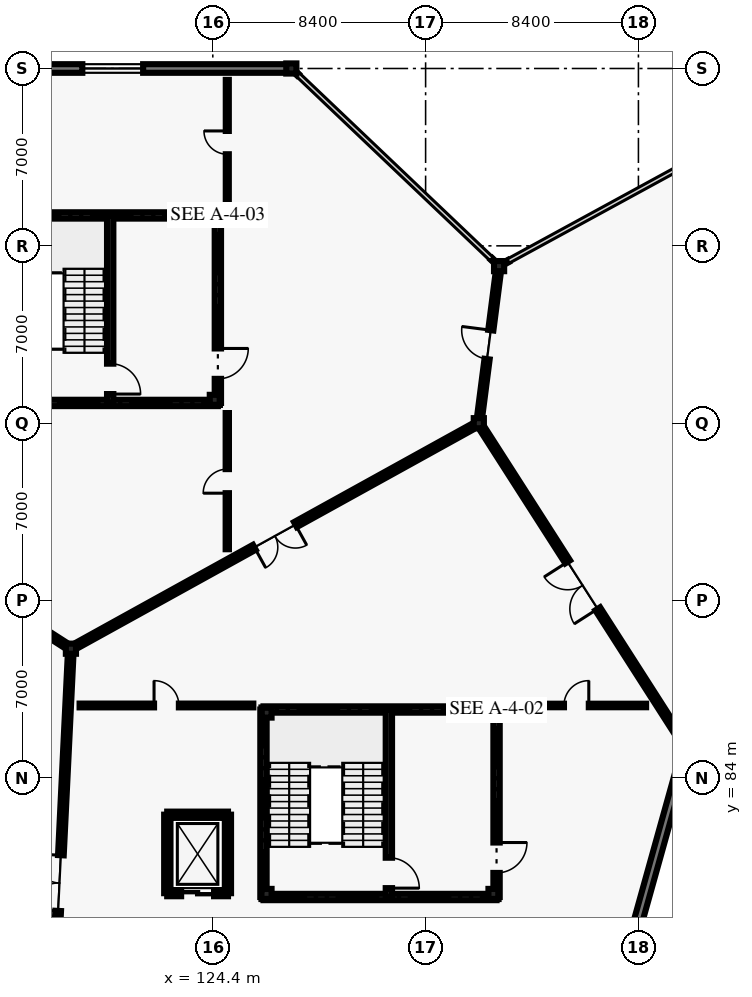
"""IFC4 building model, lengths in metres.
Left out: names, types, materials, properties, quantities, classifications, styles, units other than length and angle.
Written with IfcOpenShell. Run it as: python <this file> out.ifc"""

import sys

from ifc_helpers import new_model, si_unit, direction, frame, frame_2d, origin, origin_2d, place, context, subcontext, project, spatial, rectangle, i_section, extrude, element, fill, save


model = new_model("IFC4")
c1 = context("Model", 3, precision=1e-05, world=origin(), true_north=direction((0.0, 1.0)))
c2 = subcontext(c1, "Body", "Model", "MODEL_VIEW")
j1 = project(units=[si_unit("LENGTHUNIT", "METRE"), si_unit("PLANEANGLEUNIT", "RADIAN")], contexts=[c1])
p1 = place(None, origin())
s1 = spatial("IfcSite", under=j1, at=p1, CompositionType="ELEMENT")
p2 = place(p1, origin())
s2 = spatial("IfcBuilding", under=s1, at=p2, CompositionType="ELEMENT")
p3 = place(p2, frame((0.0, 0.0, 5.4)))
s3 = spatial("IfcBuildingStorey", under=s2, at=p3, CompositionType="ELEMENT", Elevation=5.4)
for number, where, z_axis, x_axis in (
    (1, (118.8, 89.1, 0.0), (0.0, 0.0, 1.0), (1.0, 0.0, 0.0)),
    (2, (127.5, 112.0, 0.0), (0.0, 0.0, 1.0), (1.0, 0.0, 0.0)),
    (3, (134.9, 98.0, 0.0), (0.0, 0.0, 1.0), (1.0, 0.0, 0.0)),
    (4, (135.7, 104.2, 0.0), (0.0, 0.0, 1.0), (1.0, 0.0, 0.0)),
    (5, (126.52, 79.42, 0.0), (0.0, 0.0, 1.0), (1.0, 0.0, 0.0)),
    (6, (135.48, 79.42, 0.0), (0.0, 0.0, 1.0), (1.0, 0.0, 0.0)),
    (7, (135.48, 86.58, 0.0), (0.0, 0.0, 1.0), (1.0, 0.0, 0.0)),
    (8, (126.52, 86.58, 0.0), (0.0, 0.0, 1.0), (1.0, 0.0, 0.0)),
    (9, (124.48, 98.92, 0.0), (0.0, 0.0, 1.0), (1.0, 0.0, 0.0)),
    (10, (124.48, 106.08, 0.0), (0.0, 0.0, 1.0), (1.0, 0.0, 0.0)),
):
    element("IfcColumn", number, at=place(p3, frame(where, z_axis=z_axis, x_axis=x_axis)), inside=s3, PredefinedType="COLUMN", context=c2, shape_type="SweptSolid", body=[
        extrude(i_section(OverallWidth=0.4, OverallDepth=0.4, WebThickness=0.022, FlangeThickness=0.036, at=origin_2d()), origin(), (0.0, 0.0, 1.0), 4.8),
    ])
p4 = place(p3, frame((143.084, 85.142, 0.0), z_axis=(0.0, 0.0, 1.0), x_axis=(-0.268810029922, -0.963193214165, 0.0)))
e11 = element("IfcWall", 11, at=p4, inside=s3, PredefinedType="SOLIDWALL", context=c2, shape_type="SweptSolid", body=[
    extrude(rectangle(XDim=13.333, YDim=0.34, at=frame_2d((6.667, 0.0))), origin(), (0.0, 0.0, 1.0), 3.62),
])
for number, where, z_axis, x_axis in (
    (12, (127.53, 111.971, 0.0), (0.0, 0.0, 1.0), (0.726, -0.687, 0.0)),
    (13, (135.403, 104.482, 0.0), (0.0, 0.0, 1.0), (0.726, -0.687, 0.0)),
):
    element("IfcWall", number, at=place(p3, frame(where, z_axis=z_axis, x_axis=x_axis)), inside=s3, PredefinedType="SOLIDWALL", context=c2, shape_type="SweptSolid", body=[
        extrude(rectangle(XDim=0.308, YDim=0.095, at=frame_2d((0.154, 0.0))), origin(), (0.0, 0.0, 1.0), 3.62),
    ])
p5 = place(p3, frame((113.4, 112.0, 0.0), z_axis=(0.0, 0.0, 1.0), x_axis=(1.0, 0.0, 0.0)))
e14 = element("IfcWall", 14, at=p5, inside=s3, PredefinedType="SOLIDWALL", context=c2, shape_type="SweptSolid", body=[
    extrude(rectangle(XDim=14.1, YDim=0.34, at=frame_2d((7.05, 0.0))), origin(), (0.0, 0.0, 1.0), 3.62),
])
p6 = place(p5, frame((5.85, 0.0, 0.95)))
e15 = element("IfcOpeningElement", 15, at=p6, cuts=e14, PredefinedType="OPENING", context=c2, shape_type="SweptSolid", body=[
    extrude(rectangle(XDim=2.4, YDim=1.8, at=frame_2d((1.2, 0.9))), frame((0.0, 0.18, 0.0), z_axis=(0.0, -1.0, 0.0), x_axis=(1.0, 0.0, 0.0)), (0.0, 0.0, 1.0), 0.36),
])
p7 = place(p3, frame((135.79, 104.249, 0.0), z_axis=(0.0, 0.0, 1.0), x_axis=(0.876984894636, 0.480517944077, 0.0)))
e16 = element("IfcWall", 16, at=p7, inside=s3, PredefinedType="SOLIDWALL", context=c2, shape_type="SweptSolid", body=[
    extrude(rectangle(XDim=0.308, YDim=0.095, at=frame_2d((0.154, 0.0))), origin(), (0.0, 0.0, 1.0), 3.62),
])
p8 = place(p3, frame((117.9, 70.6, 0.0), z_axis=(0.0, 0.0, 1.0), x_axis=(0.048599072515, 0.998818366947, 0.0)))
e17 = element("IfcWall", 17, at=p8, inside=s3, PredefinedType="SOLIDWALL", context=c2, shape_type="SweptSolid", body=[
    extrude(rectangle(XDim=18.522, YDim=0.225, at=frame_2d((9.261, 0.0))), origin(), (0.0, 0.0, 1.0), 4.02),
])
p9 = place(p8, frame((8.161, 0.0, 0.0)))
e18 = element("IfcOpeningElement", 18, at=p9, cuts=e17, PredefinedType="OPENING", context=c2, shape_type="SweptSolid", body=[
    extrude(rectangle(XDim=2.2, YDim=2.6, at=frame_2d((1.1, 1.3))), frame((0.0, 0.123, 0.0), z_axis=(0.0, -1.0, 0.0), x_axis=(1.0, 0.0, 0.0)), (0.0, 0.0, 1.0), 0.245),
])
p10 = place(p3, frame((118.8, 89.1, 0.0), z_axis=(0.0, 0.0, 1.0), x_axis=(-0.841183241423, 0.540750177392, 0.0)))
e19 = element("IfcWall", 19, at=p10, inside=s3, PredefinedType="SOLIDWALL", context=c2, shape_type="SweptSolid", body=[
    extrude(rectangle(XDim=18.308, YDim=0.225, at=frame_2d((9.154, 0.0))), origin(), (0.0, 0.0, 1.0), 4.02),
])
p11 = place(p10, frame((8.154, 0.0, 0.0)))
e20 = element("IfcOpeningElement", 20, at=p11, cuts=e19, PredefinedType="OPENING", context=c2, shape_type="SweptSolid", body=[
    extrude(rectangle(XDim=2.0, YDim=2.5, at=frame_2d((1.0, 1.25))), frame((0.0, 0.123, 0.0), z_axis=(0.0, -1.0, 0.0), x_axis=(1.0, 0.0, 0.0)), (0.0, 0.0, 1.0), 0.245),
])
p12 = place(p3, frame((134.9, 98.0, 0.0), z_axis=(0.0, 0.0, 1.0), x_axis=(-0.875181353329, -0.483794996652, 0.0)))
e21 = element("IfcWall", 21, at=p12, inside=s3, PredefinedType="SOLIDWALL", context=c2, shape_type="SweptSolid", body=[
    extrude(rectangle(XDim=18.396, YDim=0.225, at=frame_2d((9.198, 0.0))), origin(), (0.0, 0.0, 1.0), 4.02),
])
p13 = place(p12, frame((8.273, 0.0, 0.0)))
e22 = element("IfcOpeningElement", 22, at=p13, cuts=e21, PredefinedType="OPENING", context=c2, shape_type="SweptSolid", body=[
    extrude(rectangle(XDim=1.85, YDim=2.4, at=frame_2d((0.925, 1.2))), frame((0.0, 0.123, 0.0), z_axis=(0.0, -1.0, 0.0), x_axis=(1.0, 0.0, 0.0)), (0.0, 0.0, 1.0), 0.245),
])
p14 = place(p3, frame((143.1, 85.2, 0.0), z_axis=(0.0, 0.0, 1.0), x_axis=(-0.539434641352, 0.842027474439, 0.0)))
e23 = element("IfcWall", 23, at=p14, inside=s3, PredefinedType="SOLIDWALL", context=c2, shape_type="SweptSolid", body=[
    extrude(rectangle(XDim=15.201, YDim=0.225, at=frame_2d((7.601, 0.0))), origin(), (0.0, 0.0, 1.0), 4.02),
])
p15 = place(p14, frame((6.501, 0.0, 0.0)))
e24 = element("IfcOpeningElement", 24, at=p15, cuts=e23, PredefinedType="OPENING", context=c2, shape_type="SweptSolid", body=[
    extrude(rectangle(XDim=2.2, YDim=2.6, at=frame_2d((1.1, 1.3))), frame((0.0, 0.123, 0.0), z_axis=(0.0, -1.0, 0.0), x_axis=(1.0, 0.0, 0.0)), (0.0, 0.0, 1.0), 0.245),
])
p16 = place(p3, frame((134.9, 98.0, 0.0), z_axis=(0.0, 0.0, 1.0), x_axis=(0.127980011854, 0.991776747341, 0.0)))
e25 = element("IfcWall", 25, at=p16, inside=s3, PredefinedType="SOLIDWALL", context=c2, shape_type="SweptSolid", body=[
    extrude(rectangle(XDim=6.251, YDim=0.205, at=frame_2d((3.126, 0.0))), origin(), (0.0, 0.0, 1.0), 3.32),
])
p17 = place(p16, frame((2.551, 0.0, 0.0)))
e26 = element("IfcOpeningElement", 26, at=p17, cuts=e25, PredefinedType="OPENING", context=c2, shape_type="SweptSolid", body=[
    extrude(rectangle(XDim=1.15, YDim=2.2, at=frame_2d((0.575, 1.1))), frame((0.0, 0.113, 0.0), z_axis=(0.0, -1.0, 0.0), x_axis=(1.0, 0.0, 0.0)), (0.0, 0.0, 1.0), 0.225),
])
p18 = place(p3, frame((119.142, 86.859, 0.0), z_axis=(0.0, 0.0, 1.0), x_axis=(1.0, 0.0, 0.0)))
e27 = element("IfcWall", 27, at=p18, inside=s3, PredefinedType="PARTITIONING", context=c2, shape_type="SweptSolid", body=[
    extrude(rectangle(XDim=6.858, YDim=0.15, at=frame_2d((3.429, 0.0))), origin(), (0.0, 0.0, 1.0), 3.32),
])
p19 = place(p18, frame((2.939, 0.0, 0.0)))
e28 = element("IfcOpeningElement", 28, at=p19, cuts=e27, PredefinedType="OPENING", context=c2, shape_type="SweptSolid", body=[
    extrude(rectangle(XDim=0.98, YDim=2.15, at=frame_2d((0.49, 1.075))), frame((0.0, 0.085, 0.0), z_axis=(0.0, -1.0, 0.0), x_axis=(1.0, 0.0, 0.0)), (0.0, 0.0, 1.0), 0.17),
])
p20 = place(p3, frame((136.0, 86.859, 0.0), z_axis=(0.0, 0.0, 1.0), x_axis=(1.0, 0.0, 0.0)))
e29 = element("IfcWall", 29, at=p20, inside=s3, PredefinedType="PARTITIONING", context=c2, shape_type="SweptSolid", body=[
    extrude(rectangle(XDim=5.503, YDim=0.14, at=frame_2d((2.751, 0.0))), origin(), (0.0, 0.0, 1.0), 3.32),
])
p21 = place(p20, frame((2.261, 0.0, 0.0)))
e30 = element("IfcOpeningElement", 30, at=p21, cuts=e29, PredefinedType="OPENING", context=c2, shape_type="SweptSolid", body=[
    extrude(rectangle(XDim=0.98, YDim=2.15, at=frame_2d((0.49, 1.075))), frame((0.0, 0.08, 0.0), z_axis=(0.0, -1.0, 0.0), x_axis=(1.0, 0.0, 0.0)), (0.0, 0.0, 1.0), 0.16),
])
p22 = place(p3, frame((124.972, 93.026, 0.0), z_axis=(0.0, 0.0, 1.0), x_axis=(0.0, 1.0, 0.0)))
e31 = element("IfcWall", 31, at=p22, inside=s3, PredefinedType="PARTITIONING", context=c2, shape_type="SweptSolid", body=[
    extrude(rectangle(XDim=5.374, YDim=0.13, at=frame_2d((2.687, 0.0))), origin(), (0.0, 0.0, 1.0), 3.32),
])
p23 = place(p22, frame((2.212, 0.0, 0.0)))
e32 = element("IfcOpeningElement", 32, at=p23, cuts=e31, PredefinedType="OPENING", context=c2, shape_type="SweptSolid", body=[
    extrude(rectangle(XDim=0.95, YDim=2.15, at=frame_2d((0.475, 1.075))), frame((0.0, 0.075, 0.0), z_axis=(0.0, -1.0, 0.0), x_axis=(1.0, 0.0, 0.0)), (0.0, 0.0, 1.0), 0.15),
])
p24 = place(p3, frame((124.972, 106.6, 0.0), z_axis=(0.0, 0.0, 1.0), x_axis=(0.0, 1.0, 0.0)))
e33 = element("IfcWall", 33, at=p24, inside=s3, PredefinedType="PARTITIONING", context=c2, shape_type="SweptSolid", body=[
    extrude(rectangle(XDim=4.95, YDim=0.12, at=frame_2d((2.475, 0.0))), origin(), (0.0, 0.0, 1.0), 3.32),
])
p25 = place(p24, frame((2.015, 0.0, 0.0)))
e34 = element("IfcOpeningElement", 34, at=p25, cuts=e33, PredefinedType="OPENING", context=c2, shape_type="SweptSolid", body=[
    extrude(rectangle(XDim=0.92, YDim=2.1, at=frame_2d((0.46, 1.05))), frame((0.0, 0.07, 0.0), z_axis=(0.0, -1.0, 0.0), x_axis=(1.0, 0.0, 0.0)), (0.0, 0.0, 1.0), 0.14),
])
p26 = place(p3, frame((126.4, 79.3, 0.0), z_axis=(0.0, 0.0, 1.0), x_axis=(0.0, 1.0, 0.0)))
e35 = element("IfcWall", 35, at=p26, inside=s3, PredefinedType="SHEAR", context=c2, shape_type="SweptSolid", body=[
    extrude(rectangle(XDim=7.4, YDim=0.25, at=frame_2d((3.7, 0.0))), origin(), (0.0, 0.0, 1.0), 4.56),
])
for number, where, z_axis, x_axis in (
    (36, (126.4, 86.7, 0.0), (0.0, 0.0, 1.0), (1.0, 0.0, 0.0)),
    (37, (135.6, 79.3, 0.0), (0.0, 0.0, 1.0), (-1.0, 0.0, 0.0)),
):
    element("IfcWall", number, at=place(p3, frame(where, z_axis=z_axis, x_axis=x_axis)), inside=s3, PredefinedType="SHEAR", context=c2, shape_type="SweptSolid", body=[
        extrude(rectangle(XDim=9.2, YDim=0.25, at=frame_2d((4.6, 0.0))), origin(), (0.0, 0.0, 1.0), 4.56),
    ])
p27 = place(p3, frame((135.6, 86.7, 0.0), z_axis=(0.0, 0.0, 1.0), x_axis=(0.0, -1.0, 0.0)))
e38 = element("IfcWall", 38, at=p27, inside=s3, PredefinedType="SHEAR", context=c2, shape_type="SweptSolid", body=[
    extrude(rectangle(XDim=7.4, YDim=0.25, at=frame_2d((3.7, 0.0))), origin(), (0.0, 0.0, 1.0), 4.56),
])
p28 = place(p27, frame((5.25, 0.0, 0.0)))
e39 = element("IfcOpeningElement", 39, at=p28, cuts=e38, PredefinedType="OPENING", context=c2, shape_type="SweptSolid", body=[
    extrude(rectangle(XDim=1.2, YDim=2.2, at=frame_2d((0.6, 1.1))), frame((0.0, 0.135, 0.0), z_axis=(0.0, -1.0, 0.0), x_axis=(1.0, 0.0, 0.0)), (0.0, 0.0, 1.0), 0.27),
])
p29 = place(p3, frame((131.35, 86.7, 0.0), z_axis=(0.0, 0.0, 1.0), x_axis=(0.0, -1.0, 0.0)))
e40 = element("IfcWall", 40, at=p29, inside=s3, PredefinedType="SHEAR", context=c2, shape_type="SweptSolid", body=[
    extrude(rectangle(XDim=7.4, YDim=0.25, at=frame_2d((3.7, 0.0))), origin(), (0.0, 0.0, 1.0), 4.56),
])
p30 = place(p29, frame((5.85, 0.0, 0.0)))
e41 = element("IfcOpeningElement", 41, at=p30, cuts=e40, PredefinedType="OPENING", context=c2, shape_type="SweptSolid", body=[
    extrude(rectangle(XDim=1.2, YDim=2.2, at=frame_2d((0.6, 1.1))), frame((0.0, 0.135, 0.0), z_axis=(0.0, -1.0, 0.0), x_axis=(1.0, 0.0, 0.0)), (0.0, 0.0, 1.0), 0.27),
])
for number, where, z_axis, x_axis in (
    (42, (115.4, 106.2, 0.0), (0.0, 0.0, 1.0), (1.0, 0.0, 0.0)),
    (43, (124.6, 98.8, 0.0), (0.0, 0.0, 1.0), (-1.0, 0.0, 0.0)),
):
    element("IfcWall", number, at=place(p3, frame(where, z_axis=z_axis, x_axis=x_axis)), inside=s3, PredefinedType="SHEAR", context=c2, shape_type="SweptSolid", body=[
        extrude(rectangle(XDim=9.2, YDim=0.25, at=frame_2d((4.6, 0.0))), origin(), (0.0, 0.0, 1.0), 4.56),
    ])
p31 = place(p3, frame((124.6, 106.2, 0.0), z_axis=(0.0, 0.0, 1.0), x_axis=(0.0, -1.0, 0.0)))
e44 = element("IfcWall", 44, at=p31, inside=s3, PredefinedType="SHEAR", context=c2, shape_type="SweptSolid", body=[
    extrude(rectangle(XDim=7.4, YDim=0.25, at=frame_2d((3.7, 0.0))), origin(), (0.0, 0.0, 1.0), 4.56),
])
p32 = place(p31, frame((5.25, 0.0, 0.0)))
e45 = element("IfcOpeningElement", 45, at=p32, cuts=e44, PredefinedType="OPENING", context=c2, shape_type="SweptSolid", body=[
    extrude(rectangle(XDim=1.2, YDim=2.2, at=frame_2d((0.6, 1.1))), frame((0.0, 0.135, 0.0), z_axis=(0.0, -1.0, 0.0), x_axis=(1.0, 0.0, 0.0)), (0.0, 0.0, 1.0), 0.27),
])
p33 = place(p3, frame((120.35, 106.2, 0.0), z_axis=(0.0, 0.0, 1.0), x_axis=(0.0, -1.0, 0.0)))
e46 = element("IfcWall", 46, at=p33, inside=s3, PredefinedType="SHEAR", context=c2, shape_type="SweptSolid", body=[
    extrude(rectangle(XDim=7.4, YDim=0.25, at=frame_2d((3.7, 0.0))), origin(), (0.0, 0.0, 1.0), 4.56),
])
p34 = place(p33, frame((5.85, 0.0, 0.0)))
e47 = element("IfcOpeningElement", 47, at=p34, cuts=e46, PredefinedType="OPENING", context=c2, shape_type="SweptSolid", body=[
    extrude(rectangle(XDim=1.2, YDim=2.2, at=frame_2d((0.6, 1.1))), frame((0.0, 0.135, 0.0), z_axis=(0.0, -1.0, 0.0), x_axis=(1.0, 0.0, 0.0)), (0.0, 0.0, 1.0), 0.27),
])
p35 = place(p3, frame((122.6, 82.55, 0.0), z_axis=(0.0, 0.0, 1.0), x_axis=(1.0, 0.0, 0.0)))
e48 = element("IfcWall", 48, at=p35, inside=s3, PredefinedType="SHEAR", context=c2, shape_type="SweptSolid", body=[
    extrude(rectangle(XDim=2.4, YDim=0.24, at=frame_2d((1.2, 0.0))), origin(), (0.0, 0.0, 1.0), 4.56),
])
for number, where, z_axis, x_axis in (
    (49, (125.0, 82.55, 0.0), (0.0, 0.0, 1.0), (0.0, -1.0, 0.0)),
    (50, (122.6, 79.45, 0.0), (0.0, 0.0, 1.0), (0.0, 1.0, 0.0)),
):
    element("IfcWall", number, at=place(p3, frame(where, z_axis=z_axis, x_axis=x_axis)), inside=s3, PredefinedType="SHEAR", context=c2, shape_type="SweptSolid", body=[
        extrude(rectangle(XDim=3.1, YDim=0.24, at=frame_2d((1.55, 0.0))), origin(), (0.0, 0.0, 1.0), 4.56),
    ])
p36 = place(p3, frame((125.0, 79.45, 0.0), z_axis=(0.0, 0.0, 1.0), x_axis=(-1.0, 0.0, 0.0)))
e51 = element("IfcWall", 51, at=p36, inside=s3, PredefinedType="SHEAR", context=c2, shape_type="SweptSolid", body=[
    extrude(rectangle(XDim=2.4, YDim=0.24, at=frame_2d((1.2, 0.0))), origin(), (0.0, 0.0, 1.0), 4.56),
])
p37 = place(p36, frame((0.55, 0.0, 0.0)))
e52 = element("IfcOpeningElement", 52, at=p37, cuts=e51, PredefinedType="OPENING", context=c2, shape_type="SweptSolid", body=[
    extrude(rectangle(XDim=1.3, YDim=2.25, at=frame_2d((0.65, 1.125))), frame((0.0, 0.13, 0.0), z_axis=(0.0, -1.0, 0.0), x_axis=(1.0, 0.0, 0.0)), (0.0, 0.0, 1.0), 0.26),
])
p38 = place(p6, origin())
e53 = element("IfcWindow", 53, at=p38, inside=s3, PartitioningType="SINGLE_PANEL", PredefinedType="WINDOW", context=c2, shape_type="SweptSolid", body=[
    extrude(rectangle(XDim=2.4, YDim=1.8, at=frame_2d((1.2, 0.9))), frame((0.0, 0.03, 0.0), z_axis=(0.0, -1.0, 0.0), x_axis=(1.0, 0.0, 0.0)), (0.0, 0.0, 1.0), 0.06),
])
fill(e15, e53)
p39 = place(p9, origin())
e54 = element("IfcDoor", 54, at=p39, inside=s3, OperationType="DOUBLE_DOOR_SINGLE_SWING", PredefinedType="DOOR", context=c2, shape_type="SweptSolid", body=[
    extrude(rectangle(XDim=2.2, YDim=2.6, at=frame_2d((1.1, 1.3))), frame((0.0, 0.025, 0.0), z_axis=(0.0, -1.0, 0.0), x_axis=(1.0, 0.0, 0.0)), (0.0, 0.0, 1.0), 0.05),
])
fill(e18, e54)
p40 = place(p13, origin())
e55 = element("IfcDoor", 55, at=p40, inside=s3, OperationType="DOUBLE_DOOR_SINGLE_SWING", PredefinedType="DOOR", context=c2, shape_type="SweptSolid", body=[
    extrude(rectangle(XDim=1.85, YDim=2.4, at=frame_2d((0.925, 1.2))), frame((0.0, 0.025, 0.0), z_axis=(0.0, -1.0, 0.0), x_axis=(1.0, 0.0, 0.0)), (0.0, 0.0, 1.0), 0.05),
])
fill(e22, e55)
p41 = place(p15, origin())
e56 = element("IfcDoor", 56, at=p41, inside=s3, OperationType="DOUBLE_DOOR_SINGLE_SWING", PredefinedType="DOOR", context=c2, shape_type="SweptSolid", body=[
    extrude(rectangle(XDim=2.2, YDim=2.6, at=frame_2d((1.1, 1.3))), frame((0.0, 0.025, 0.0), z_axis=(0.0, -1.0, 0.0), x_axis=(1.0, 0.0, 0.0)), (0.0, 0.0, 1.0), 0.05),
])
fill(e24, e56)
p42 = place(p17, origin())
e57 = element("IfcDoor", 57, at=p42, inside=s3, OperationType="SINGLE_SWING_RIGHT", PredefinedType="DOOR", context=c2, shape_type="SweptSolid", body=[
    extrude(rectangle(XDim=1.15, YDim=2.2, at=frame_2d((0.575, 1.1))), frame((0.0, 0.025, 0.0), z_axis=(0.0, -1.0, 0.0), x_axis=(1.0, 0.0, 0.0)), (0.0, 0.0, 1.0), 0.05),
])
fill(e26, e57)
p43 = place(p19, origin())
e58 = element("IfcDoor", 58, at=p43, inside=s3, OperationType="SINGLE_SWING_LEFT", PredefinedType="DOOR", context=c2, shape_type="SweptSolid", body=[
    extrude(rectangle(XDim=0.98, YDim=2.15, at=frame_2d((0.49, 1.075))), frame((0.0, 0.025, 0.0), z_axis=(0.0, -1.0, 0.0), x_axis=(1.0, 0.0, 0.0)), (0.0, 0.0, 1.0), 0.05),
])
fill(e28, e58)
p44 = place(p21, origin())
e59 = element("IfcDoor", 59, at=p44, inside=s3, OperationType="SINGLE_SWING_RIGHT", PredefinedType="DOOR", context=c2, shape_type="SweptSolid", body=[
    extrude(rectangle(XDim=0.98, YDim=2.15, at=frame_2d((0.49, 1.075))), frame((0.0, 0.025, 0.0), z_axis=(0.0, -1.0, 0.0), x_axis=(1.0, 0.0, 0.0)), (0.0, 0.0, 1.0), 0.05),
])
fill(e30, e59)
p45 = place(p23, origin())
e60 = element("IfcDoor", 60, at=p45, inside=s3, OperationType="SINGLE_SWING_LEFT", PredefinedType="DOOR", context=c2, shape_type="SweptSolid", body=[
    extrude(rectangle(XDim=0.95, YDim=2.15, at=frame_2d((0.475, 1.075))), frame((0.0, 0.025, 0.0), z_axis=(0.0, -1.0, 0.0), x_axis=(1.0, 0.0, 0.0)), (0.0, 0.0, 1.0), 0.05),
])
fill(e32, e60)
p46 = place(p25, origin())
e61 = element("IfcDoor", 61, at=p46, inside=s3, OperationType="SINGLE_SWING_RIGHT", PredefinedType="DOOR", context=c2, shape_type="SweptSolid", body=[
    extrude(rectangle(XDim=0.92, YDim=2.1, at=frame_2d((0.46, 1.05))), frame((0.0, 0.025, 0.0), z_axis=(0.0, -1.0, 0.0), x_axis=(1.0, 0.0, 0.0)), (0.0, 0.0, 1.0), 0.05),
])
fill(e34, e61)
p47 = place(p28, origin())
e62 = element("IfcDoor", 62, at=p47, inside=s3, OperationType="SINGLE_SWING_LEFT", PredefinedType="DOOR", context=c2, shape_type="SweptSolid", body=[
    extrude(rectangle(XDim=1.2, YDim=2.2, at=frame_2d((0.6, 1.1))), frame((0.0, 0.025, 0.0), z_axis=(0.0, -1.0, 0.0), x_axis=(1.0, 0.0, 0.0)), (0.0, 0.0, 1.0), 0.05),
])
fill(e39, e62)
p48 = place(p30, origin())
e63 = element("IfcDoor", 63, at=p48, inside=s3, OperationType="SINGLE_SWING_RIGHT", PredefinedType="DOOR", context=c2, shape_type="SweptSolid", body=[
    extrude(rectangle(XDim=1.2, YDim=2.2, at=frame_2d((0.6, 1.1))), frame((0.0, 0.025, 0.0), z_axis=(0.0, -1.0, 0.0), x_axis=(1.0, 0.0, 0.0)), (0.0, 0.0, 1.0), 0.05),
])
fill(e41, e63)
p49 = place(p32, origin())
e64 = element("IfcDoor", 64, at=p49, inside=s3, OperationType="SINGLE_SWING_LEFT", PredefinedType="DOOR", context=c2, shape_type="SweptSolid", body=[
    extrude(rectangle(XDim=1.2, YDim=2.2, at=frame_2d((0.6, 1.1))), frame((0.0, 0.025, 0.0), z_axis=(0.0, -1.0, 0.0), x_axis=(1.0, 0.0, 0.0)), (0.0, 0.0, 1.0), 0.05),
])
fill(e45, e64)
p50 = place(p34, origin())
e65 = element("IfcDoor", 65, at=p50, inside=s3, OperationType="SINGLE_SWING_RIGHT", PredefinedType="DOOR", context=c2, shape_type="SweptSolid", body=[
    extrude(rectangle(XDim=1.2, YDim=2.2, at=frame_2d((0.6, 1.1))), frame((0.0, 0.025, 0.0), z_axis=(0.0, -1.0, 0.0), x_axis=(1.0, 0.0, 0.0)), (0.0, 0.0, 1.0), 0.05),
])
fill(e47, e65)
p51 = place(p37, origin())
e66 = element("IfcDoor", 66, at=p51, inside=s3, OperationType="SLIDING_TO_LEFT", PredefinedType="DOOR", context=c2, shape_type="SweptSolid", body=[
    extrude(rectangle(XDim=1.3, YDim=2.25, at=frame_2d((0.65, 1.125))), frame((0.0, 0.025, 0.0), z_axis=(0.0, -1.0, 0.0), x_axis=(1.0, 0.0, 0.0)), (0.0, 0.0, 1.0), 0.05),
])
fill(e52, e66)
save(model, sys.argv[1])
